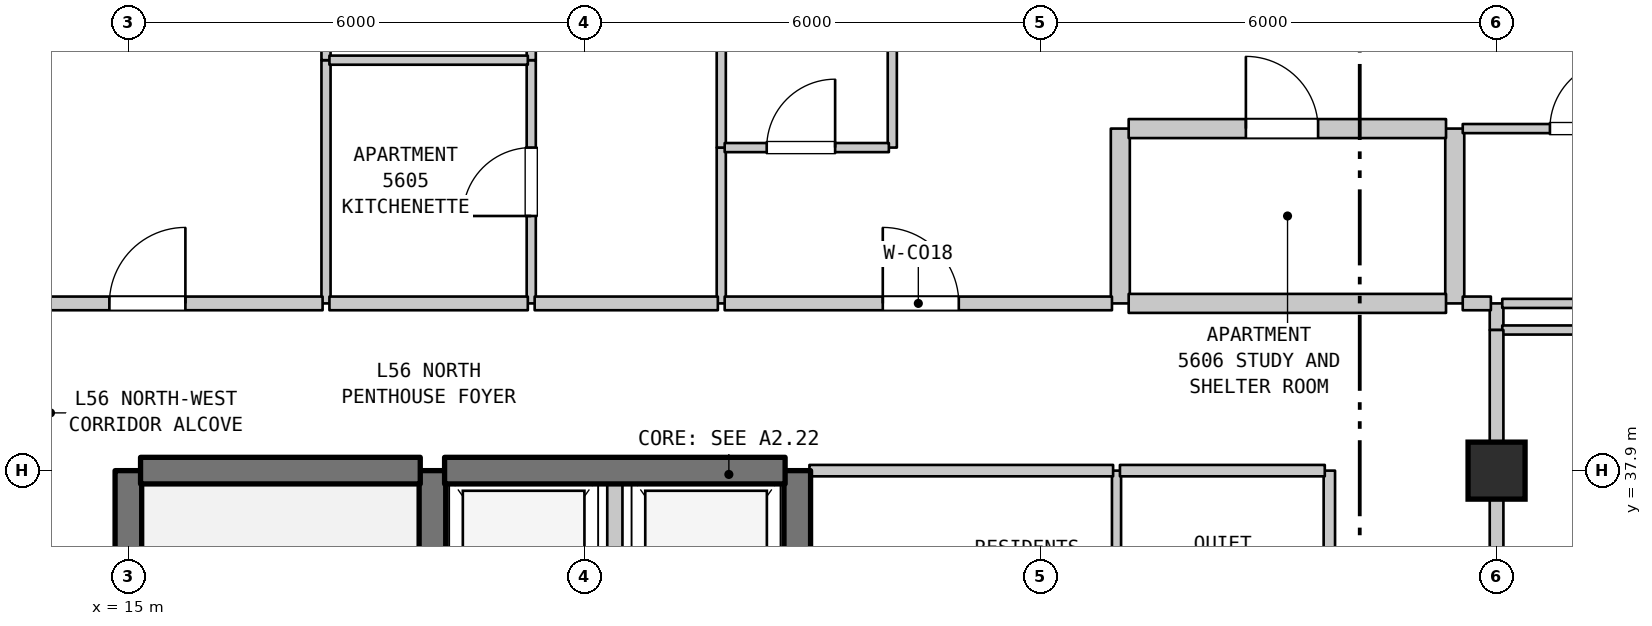
"""IFC4 building model, lengths in metres.
Left out: names, types, materials, properties, quantities, classifications, styles, units other than length and angle.
Written with IfcOpenShell. Run it as: python <this file> out.ifc"""

import sys

from ifc_helpers import new_model, si_unit, direction, frame, frame_2d, origin, origin_2d, place, context, subcontext, project, spatial, rectangle, extrude, element, fill, save


model = new_model("IFC4")
c1 = context("Model", 3, precision=1e-05, world=origin(), true_north=direction((0.0, 1.0)))
c2 = subcontext(c1, "Body", "Model", "MODEL_VIEW")
j1 = project(units=[si_unit("LENGTHUNIT", "METRE"), si_unit("PLANEANGLEUNIT", "RADIAN")], contexts=[c1])
p1 = place(None, origin())
s1 = spatial("IfcSite", under=j1, at=p1, CompositionType="ELEMENT")
p2 = place(p1, origin())
s2 = spatial("IfcBuilding", under=s1, at=p2, CompositionType="ELEMENT")
p3 = place(p2, frame((0.0, 0.0, 226.5)))
s3 = spatial("IfcBuildingStorey", under=s2, at=p3, CompositionType="ELEMENT", Elevation=226.5)
p4 = place(p3, frame((33.0, 37.9, 0.0), z_axis=(0.0, 0.0, 1.0), x_axis=(1.0, 0.0, 0.0)))
e1 = element("IfcColumn", 1, at=p4, inside=s3, PredefinedType="COLUMN", context=c2, shape_type="SweptSolid", body=[
    extrude(rectangle(XDim=0.75, YDim=0.75, at=origin_2d()), origin(), (0.0, 0.0, 1.0), 3.7),
])
p5 = place(p3, frame((15.0, 31.1, 0.0), z_axis=(0.0, 0.0, 1.0), x_axis=(0.0, 1.0, 0.0)))
e2 = element("IfcWall", 2, at=p5, inside=s3, PredefinedType="SHEAR", context=c2, shape_type="SweptSolid", body=[
    extrude(rectangle(XDim=6.8, YDim=0.35, at=frame_2d((3.4, 0.0))), origin(), (0.0, 0.0, 1.0), 3.39),
])
p6 = place(p3, frame((17.6, 40.1, 0.0), z_axis=(0.0, 0.0, 1.0), x_axis=(0.0, 1.0, 0.0)))
e3 = element("IfcWall", 3, at=p6, inside=s3, PredefinedType="PARTITIONING", context=c2, shape_type="SweptSolid", body=[
    extrude(rectangle(XDim=3.2, YDim=0.12, at=frame_2d((1.6, 0.0))), origin(), (0.0, 0.0, 1.0), 3.39),
])
p7 = place(p3, frame((17.6, 43.3, 0.0), z_axis=(0.0, 0.0, 1.0), x_axis=(0.0, 1.0, 0.0)))
e4 = element("IfcWall", 4, at=p7, inside=s3, PredefinedType="PARTITIONING", context=c2, shape_type="SweptSolid", body=[
    extrude(rectangle(XDim=2.9, YDim=0.12, at=frame_2d((1.45, 0.0))), origin(), (0.0, 0.0, 1.0), 3.39),
])
p8 = place(p7, frame((1.0, 0.0, 0.0)))
e5 = element("IfcOpeningElement", 5, at=p8, cuts=e4, PredefinedType="OPENING", context=c2, shape_type="SweptSolid", body=[
    extrude(rectangle(XDim=0.9, YDim=2.1, at=frame_2d((0.45, 1.05))), frame((0.0, 0.07, 0.0), z_axis=(0.0, -1.0, 0.0), x_axis=(1.0, 0.0, 0.0)), (0.0, 0.0, 1.0), 0.14),
])
p9 = place(p3, frame((19.0, 35.0, 0.0), z_axis=(0.0, 0.0, 1.0), x_axis=(0.0, 1.0, 0.0)))
e6 = element("IfcWall", 6, at=p9, inside=s3, PredefinedType="SHEAR", context=c2, shape_type="SweptSolid", body=[
    extrude(rectangle(XDim=2.9, YDim=0.35, at=frame_2d((1.45, 0.0))), origin(), (0.0, 0.0, 1.0), 3.39),
])
p10 = place(p3, frame((20.3, 40.1, 0.0), z_axis=(0.0, 0.0, 1.0), x_axis=(0.0, 1.0, 0.0)))
e7 = element("IfcWall", 7, at=p10, inside=s3, PredefinedType="PARTITIONING", context=c2, shape_type="SweptSolid", body=[
    extrude(rectangle(XDim=3.2, YDim=0.12, at=frame_2d((1.6, 0.0))), origin(), (0.0, 0.0, 1.0), 3.39),
])
p11 = place(p10, frame((1.15, 0.0, 0.0)))
e8 = element("IfcOpeningElement", 8, at=p11, cuts=e7, PredefinedType="OPENING", context=c2, shape_type="SweptSolid", body=[
    extrude(rectangle(XDim=0.9, YDim=2.15, at=frame_2d((0.45, 1.075))), frame((0.0, 0.07, 0.0), z_axis=(0.0, -1.0, 0.0), x_axis=(1.0, 0.0, 0.0)), (0.0, 0.0, 1.0), 0.14),
])
p12 = place(p3, frame((20.3, 43.3, 0.0), z_axis=(0.0, 0.0, 1.0), x_axis=(0.0, 1.0, 0.0)))
e9 = element("IfcWall", 9, at=p12, inside=s3, PredefinedType="PARTITIONING", context=c2, shape_type="SweptSolid", body=[
    extrude(rectangle(XDim=2.9, YDim=0.12, at=frame_2d((1.45, 0.0))), origin(), (0.0, 0.0, 1.0), 3.39),
])
p13 = place(p3, frame((21.4, 35.0, 0.0), z_axis=(0.0, 0.0, 1.0), x_axis=(0.0, 1.0, 0.0)))
e10 = element("IfcWall", 10, at=p13, inside=s3, PredefinedType="STANDARD", context=c2, shape_type="SweptSolid", body=[
    extrude(rectangle(XDim=2.9, YDim=0.2, at=frame_2d((1.45, 0.0))), origin(), (0.0, 0.0, 1.0), 3.39),
])
p14 = place(p3, frame((22.8, 40.1, 0.0), z_axis=(0.0, 0.0, 1.0), x_axis=(0.0, 1.0, 0.0)))
e11 = element("IfcWall", 11, at=p14, inside=s3, PredefinedType="PARTITIONING", context=c2, shape_type="SweptSolid", body=[
    extrude(rectangle(XDim=2.05, YDim=0.12, at=frame_2d((1.025, 0.0))), origin(), (0.0, 0.0, 1.0), 3.39),
])
p15 = place(p3, frame((22.8, 42.15, 0.0), z_axis=(0.0, 0.0, 1.0), x_axis=(0.0, 1.0, 0.0)))
e12 = element("IfcWall", 12, at=p15, inside=s3, PredefinedType="PARTITIONING", context=c2, shape_type="SweptSolid", body=[
    extrude(rectangle(XDim=11.74, YDim=0.12, at=frame_2d((5.87, 0.0))), origin(), (0.0, 0.0, 1.0), 3.39),
])
p16 = place(p3, frame((23.8, 35.0, 0.0), z_axis=(0.0, 0.0, 1.0), x_axis=(0.0, 1.0, 0.0)))
e13 = element("IfcWall", 13, at=p16, inside=s3, PredefinedType="SHEAR", context=c2, shape_type="SweptSolid", body=[
    extrude(rectangle(XDim=2.9, YDim=0.35, at=frame_2d((1.45, 0.0))), origin(), (0.0, 0.0, 1.0), 3.39),
])
p17 = place(p3, frame((25.05, 42.15, 0.0), z_axis=(0.0, 0.0, 1.0), x_axis=(0.0, 1.0, 0.0)))
e14 = element("IfcWall", 14, at=p17, inside=s3, PredefinedType="PARTITIONING", context=c2, shape_type="SweptSolid", body=[
    extrude(rectangle(XDim=11.74, YDim=0.12, at=frame_2d((5.87, 0.0))), origin(), (0.0, 0.0, 1.0), 3.39),
])
p18 = place(p3, frame((28.0, 35.0, 0.0), z_axis=(0.0, 0.0, 1.0), x_axis=(0.0, 1.0, 0.0)))
e15 = element("IfcWall", 15, at=p18, inside=s3, PredefinedType="PARTITIONING", context=c2, shape_type="SweptSolid", body=[
    extrude(rectangle(XDim=2.9, YDim=0.12, at=frame_2d((1.45, 0.0))), origin(), (0.0, 0.0, 1.0), 3.39),
])
p19 = place(p3, frame((28.05, 40.1, 0.0), z_axis=(0.0, 0.0, 1.0), x_axis=(0.0, 1.0, 0.0)))
e16 = element("IfcWall", 16, at=p19, inside=s3, PredefinedType="STANDARD", context=c2, shape_type="SweptSolid", body=[
    extrude(rectangle(XDim=2.3, YDim=0.25, at=frame_2d((1.15, 0.0))), origin(), (0.0, 0.0, 1.0), 3.39),
])
p20 = place(p3, frame((30.8, 35.0, 0.0), z_axis=(0.0, 0.0, 1.0), x_axis=(0.0, 1.0, 0.0)))
e17 = element("IfcWall", 17, at=p20, inside=s3, PredefinedType="STANDARD", context=c2, shape_type="SweptSolid", body=[
    extrude(rectangle(XDim=2.9, YDim=0.15, at=frame_2d((1.45, 0.0))), origin(), (0.0, 0.0, 1.0), 3.39),
])
p21 = place(p3, frame((32.45, 40.1, 0.0), z_axis=(0.0, 0.0, 1.0), x_axis=(0.0, 1.0, 0.0)))
e18 = element("IfcWall", 18, at=p21, inside=s3, PredefinedType="STANDARD", context=c2, shape_type="SweptSolid", body=[
    extrude(rectangle(XDim=2.3, YDim=0.25, at=frame_2d((1.15, 0.0))), origin(), (0.0, 0.0, 1.0), 3.39),
])
p22 = place(p3, frame((33.0, 35.602, 0.0), z_axis=(0.0, 0.0, 1.0), x_axis=(0.0, 1.0, 0.0)))
e19 = element("IfcWall", 19, at=p22, inside=s3, PredefinedType="STANDARD", context=c2, shape_type="SweptSolid", body=[
    extrude(rectangle(XDim=2.298, YDim=0.18, at=frame_2d((1.149, 0.0))), origin(), (0.0, 0.0, 1.0), 2.89),
])
p23 = place(p3, frame((33.0, 39.75, 0.0), z_axis=(0.0, 0.0, 1.0), x_axis=(0.0, 1.0, 0.0)))
e20 = element("IfcWall", 20, at=p23, inside=s3, PredefinedType="STANDARD", context=c2, shape_type="SweptSolid", body=[
    extrude(rectangle(XDim=0.35, YDim=0.18, at=frame_2d((0.175, 0.0))), origin(), (0.0, 0.0, 1.0), 3.39),
])
p24 = place(p3, frame((15.16, 37.9, 0.0), z_axis=(0.0, 0.0, 1.0), x_axis=(1.0, 0.0, 0.0)))
e21 = element("IfcWall", 21, at=p24, inside=s3, PredefinedType="SHEAR", context=c2, shape_type="SweptSolid", body=[
    extrude(rectangle(XDim=3.68, YDim=0.35, at=frame_2d((1.84, 0.0))), origin(), (0.0, 0.0, 1.0), 3.39),
])
p25 = place(p3, frame((19.16, 37.9, 0.0), z_axis=(0.0, 0.0, 1.0), x_axis=(1.0, 0.0, 0.0)))
e22 = element("IfcWall", 22, at=p25, inside=s3, PredefinedType="SHEAR", context=c2, shape_type="SweptSolid", body=[
    extrude(rectangle(XDim=4.48, YDim=0.35, at=frame_2d((2.24, 0.0))), origin(), (0.0, 0.0, 1.0), 3.39),
])
p26 = place(p3, frame((23.96, 37.9, 0.0), z_axis=(0.0, 0.0, 1.0), x_axis=(1.0, 0.0, 0.0)))
e23 = element("IfcWall", 23, at=p26, inside=s3, PredefinedType="STANDARD", context=c2, shape_type="SweptSolid", body=[
    extrude(rectangle(XDim=3.995, YDim=0.15, at=frame_2d((1.998, 0.0))), origin(), (0.0, 0.0, 1.0), 2.89),
])
p27 = place(p3, frame((28.045, 37.9, 0.0), z_axis=(0.0, 0.0, 1.0), x_axis=(1.0, 0.0, 0.0)))
e24 = element("IfcWall", 24, at=p27, inside=s3, PredefinedType="STANDARD", context=c2, shape_type="SweptSolid", body=[
    extrude(rectangle(XDim=2.695, YDim=0.15, at=frame_2d((1.348, 0.0))), origin(), (0.0, 0.0, 1.0), 2.89),
])
p28 = place(p3, frame((33.075, 39.75, 0.0), z_axis=(0.0, 0.0, 1.0), x_axis=(1.0, 0.0, 0.0)))
e25 = element("IfcWall", 25, at=p28, inside=s3, PredefinedType="PARTITIONING", context=c2, shape_type="SweptSolid", body=[
    extrude(rectangle(XDim=4.46, YDim=0.12, at=frame_2d((2.23, 0.0))), origin(), (0.0, 0.0, 1.0), 3.39),
])
p29 = place(p3, frame((12.975, 40.1, 0.0), z_axis=(0.0, 0.0, 1.0), x_axis=(1.0, 0.0, 0.0)))
e26 = element("IfcWall", 26, at=p29, inside=s3, PredefinedType="STANDARD", context=c2, shape_type="SweptSolid", body=[
    extrude(rectangle(XDim=4.58, YDim=0.18, at=frame_2d((2.29, 0.0))), origin(), (0.0, 0.0, 1.0), 3.39),
])
p30 = place(p29, frame((1.775, 0.0, 0.0)))
e27 = element("IfcOpeningElement", 27, at=p30, cuts=e26, PredefinedType="OPENING", context=c2, shape_type="SweptSolid", body=[
    extrude(rectangle(XDim=1.0, YDim=2.15, at=frame_2d((0.5, 1.075))), frame((0.0, 0.1, 0.0), z_axis=(0.0, -1.0, 0.0), x_axis=(1.0, 0.0, 0.0)), (0.0, 0.0, 1.0), 0.2),
])
p31 = place(p3, frame((17.645, 40.1, 0.0), z_axis=(0.0, 0.0, 1.0), x_axis=(1.0, 0.0, 0.0)))
e28 = element("IfcWall", 28, at=p31, inside=s3, PredefinedType="STANDARD", context=c2, shape_type="SweptSolid", body=[
    extrude(rectangle(XDim=2.61, YDim=0.18, at=frame_2d((1.305, 0.0))), origin(), (0.0, 0.0, 1.0), 3.39),
])
p32 = place(p3, frame((20.345, 40.1, 0.0), z_axis=(0.0, 0.0, 1.0), x_axis=(1.0, 0.0, 0.0)))
e29 = element("IfcWall", 29, at=p32, inside=s3, PredefinedType="STANDARD", context=c2, shape_type="SweptSolid", body=[
    extrude(rectangle(XDim=2.41, YDim=0.18, at=frame_2d((1.205, 0.0))), origin(), (0.0, 0.0, 1.0), 3.39),
])
p33 = place(p3, frame((22.845, 40.1, 0.0), z_axis=(0.0, 0.0, 1.0), x_axis=(1.0, 0.0, 0.0)))
e30 = element("IfcWall", 30, at=p33, inside=s3, PredefinedType="STANDARD", context=c2, shape_type="SweptSolid", body=[
    extrude(rectangle(XDim=5.095, YDim=0.18, at=frame_2d((2.547, 0.0))), origin(), (0.0, 0.0, 1.0), 3.39),
])
p34 = place(p33, frame((2.08, 0.0, 0.0)))
e31 = element("IfcOpeningElement", 31, at=p34, cuts=e30, PredefinedType="OPENING", context=c2, shape_type="SweptSolid", body=[
    extrude(rectangle(XDim=1.0, YDim=2.15, at=frame_2d((0.5, 1.075))), frame((0.0, 0.1, 0.0), z_axis=(0.0, -1.0, 0.0), x_axis=(1.0, 0.0, 0.0)), (0.0, 0.0, 1.0), 0.2),
])
p35 = place(p3, frame((28.16, 40.1, 0.0), z_axis=(0.0, 0.0, 1.0), x_axis=(1.0, 0.0, 0.0)))
e32 = element("IfcWall", 32, at=p35, inside=s3, PredefinedType="STANDARD", context=c2, shape_type="SweptSolid", body=[
    extrude(rectangle(XDim=4.175, YDim=0.25, at=frame_2d((2.087, 0.0))), origin(), (0.0, 0.0, 1.0), 3.39),
])
p36 = place(p3, frame((32.555, 40.1, 0.0), z_axis=(0.0, 0.0, 1.0), x_axis=(1.0, 0.0, 0.0)))
e33 = element("IfcWall", 33, at=p36, inside=s3, PredefinedType="STANDARD", context=c2, shape_type="SweptSolid", body=[
    extrude(rectangle(XDim=0.37, YDim=0.18, at=frame_2d((0.185, 0.0))), origin(), (0.0, 0.0, 1.0), 3.39),
])
p37 = place(p3, frame((33.075, 40.1, 0.0), z_axis=(0.0, 0.0, 1.0), x_axis=(1.0, 0.0, 0.0)))
e34 = element("IfcWall", 34, at=p37, inside=s3, PredefinedType="PARTITIONING", context=c2, shape_type="SweptSolid", body=[
    extrude(rectangle(XDim=2.882, YDim=0.12, at=frame_2d((1.441, 0.0))), origin(), (0.0, 0.0, 1.0), 3.39),
])
p38 = place(p3, frame((22.845, 42.15, 0.0), z_axis=(0.0, 0.0, 1.0), x_axis=(1.0, 0.0, 0.0)))
e35 = element("IfcWall", 35, at=p38, inside=s3, PredefinedType="PARTITIONING", context=c2, shape_type="SweptSolid", body=[
    extrude(rectangle(XDim=2.16, YDim=0.12, at=frame_2d((1.08, 0.0))), origin(), (0.0, 0.0, 1.0), 3.39),
])
p39 = place(p38, frame((0.553, 0.0, 0.0)))
e36 = element("IfcOpeningElement", 36, at=p39, cuts=e35, PredefinedType="OPENING", context=c2, shape_type="SweptSolid", body=[
    extrude(rectangle(XDim=0.9, YDim=2.15, at=frame_2d((0.45, 1.075))), frame((0.0, 0.07, 0.0), z_axis=(0.0, -1.0, 0.0), x_axis=(1.0, 0.0, 0.0)), (0.0, 0.0, 1.0), 0.14),
])
p40 = place(p3, frame((28.16, 42.4, 0.0), z_axis=(0.0, 0.0, 1.0), x_axis=(1.0, 0.0, 0.0)))
e37 = element("IfcWall", 37, at=p40, inside=s3, PredefinedType="STANDARD", context=c2, shape_type="SweptSolid", body=[
    extrude(rectangle(XDim=4.175, YDim=0.25, at=frame_2d((2.087, 0.0))), origin(), (0.0, 0.0, 1.0), 3.39),
])
p41 = place(p40, frame((1.542, 0.0, 0.0)))
e38 = element("IfcOpeningElement", 38, at=p41, cuts=e37, PredefinedType="OPENING", context=c2, shape_type="SweptSolid", body=[
    extrude(rectangle(XDim=0.95, YDim=2.15, at=frame_2d((0.475, 1.075))), frame((0.0, 0.135, 0.0), z_axis=(0.0, -1.0, 0.0), x_axis=(1.0, 0.0, 0.0)), (0.0, 0.0, 1.0), 0.27),
])
p42 = place(p3, frame((32.555, 42.4, 0.0), z_axis=(0.0, 0.0, 1.0), x_axis=(1.0, 0.0, 0.0)))
e39 = element("IfcWall", 39, at=p42, inside=s3, PredefinedType="PARTITIONING", context=c2, shape_type="SweptSolid", body=[
    extrude(rectangle(XDim=3.402, YDim=0.12, at=frame_2d((1.701, 0.0))), origin(), (0.0, 0.0, 1.0), 3.39),
])
p43 = place(p42, frame((1.147, 0.0, 0.0)))
e40 = element("IfcOpeningElement", 40, at=p43, cuts=e39, PredefinedType="OPENING", context=c2, shape_type="SweptSolid", body=[
    extrude(rectangle(XDim=0.9, YDim=2.1, at=frame_2d((0.45, 1.05))), frame((0.0, 0.07, 0.0), z_axis=(0.0, -1.0, 0.0), x_axis=(1.0, 0.0, 0.0)), (0.0, 0.0, 1.0), 0.14),
])
p44 = place(p3, frame((17.645, 43.3, 0.0), z_axis=(0.0, 0.0, 1.0), x_axis=(1.0, 0.0, 0.0)))
e41 = element("IfcWall", 41, at=p44, inside=s3, PredefinedType="PARTITIONING", context=c2, shape_type="SweptSolid", body=[
    extrude(rectangle(XDim=2.61, YDim=0.12, at=frame_2d((1.305, 0.0))), origin(), (0.0, 0.0, 1.0), 3.39),
])
p45 = place(p3, frame((33.0, 37.9, 0.0), z_axis=(0.0, 0.0, 1.0), x_axis=(0.0, 1.0, 0.0)))
e42 = element("IfcWall", 42, at=p45, inside=s3, PredefinedType="STANDARD", context=c2, shape_type="SweptSolid", body=[
    extrude(rectangle(XDim=1.85, YDim=0.18, at=frame_2d((0.925, 0.0))), origin(), (0.0, 0.0, 1.0), 2.79),
])
p46 = place(p11, origin())
e43 = element("IfcDoor", 43, at=p46, inside=s3, OperationType="SINGLE_SWING_LEFT", PredefinedType="DOOR", context=c2, shape_type="SweptSolid", body=[
    extrude(rectangle(XDim=0.9, YDim=2.15, at=frame_2d((0.45, 1.075))), frame((0.0, 0.025, 0.0), z_axis=(0.0, -1.0, 0.0), x_axis=(1.0, 0.0, 0.0)), (0.0, 0.0, 1.0), 0.05),
])
fill(e8, e43)
p47 = place(p30, origin())
e44 = element("IfcDoor", 44, at=p47, inside=s3, OperationType="SINGLE_SWING_RIGHT", PredefinedType="DOOR", context=c2, shape_type="SweptSolid", body=[
    extrude(rectangle(XDim=1.0, YDim=2.15, at=frame_2d((0.5, 1.075))), frame((0.0, 0.025, 0.0), z_axis=(0.0, -1.0, 0.0), x_axis=(1.0, 0.0, 0.0)), (0.0, 0.0, 1.0), 0.05),
])
fill(e27, e44)
p48 = place(p34, origin())
e45 = element("IfcDoor", 45, at=p48, inside=s3, OperationType="SINGLE_SWING_LEFT", PredefinedType="DOOR", context=c2, shape_type="SweptSolid", body=[
    extrude(rectangle(XDim=1.0, YDim=2.15, at=frame_2d((0.5, 1.075))), frame((0.0, 0.025, 0.0), z_axis=(0.0, -1.0, 0.0), x_axis=(1.0, 0.0, 0.0)), (0.0, 0.0, 1.0), 0.05),
])
fill(e31, e45)
p49 = place(p39, origin())
e46 = element("IfcDoor", 46, at=p49, inside=s3, OperationType="SINGLE_SWING_RIGHT", PredefinedType="DOOR", context=c2, shape_type="SweptSolid", body=[
    extrude(rectangle(XDim=0.9, YDim=2.15, at=frame_2d((0.45, 1.075))), frame((0.0, 0.025, 0.0), z_axis=(0.0, -1.0, 0.0), x_axis=(1.0, 0.0, 0.0)), (0.0, 0.0, 1.0), 0.05),
])
fill(e36, e46)
p50 = place(p41, origin())
e47 = element("IfcDoor", 47, at=p50, inside=s3, OperationType="SINGLE_SWING_LEFT", PredefinedType="DOOR", context=c2, shape_type="SweptSolid", body=[
    extrude(rectangle(XDim=0.95, YDim=2.15, at=frame_2d((0.475, 1.075))), frame((0.0, 0.025, 0.0), z_axis=(0.0, -1.0, 0.0), x_axis=(1.0, 0.0, 0.0)), (0.0, 0.0, 1.0), 0.05),
])
fill(e38, e47)
p51 = place(p43, origin())
e48 = element("IfcDoor", 48, at=p51, inside=s3, OperationType="SINGLE_SWING_RIGHT", PredefinedType="DOOR", context=c2, shape_type="SweptSolid", body=[
    extrude(rectangle(XDim=0.9, YDim=2.1, at=frame_2d((0.45, 1.05))), frame((0.0, 0.025, 0.0), z_axis=(0.0, -1.0, 0.0), x_axis=(1.0, 0.0, 0.0)), (0.0, 0.0, 1.0), 0.05),
])
fill(e40, e48)
save(model, sys.argv[1])
